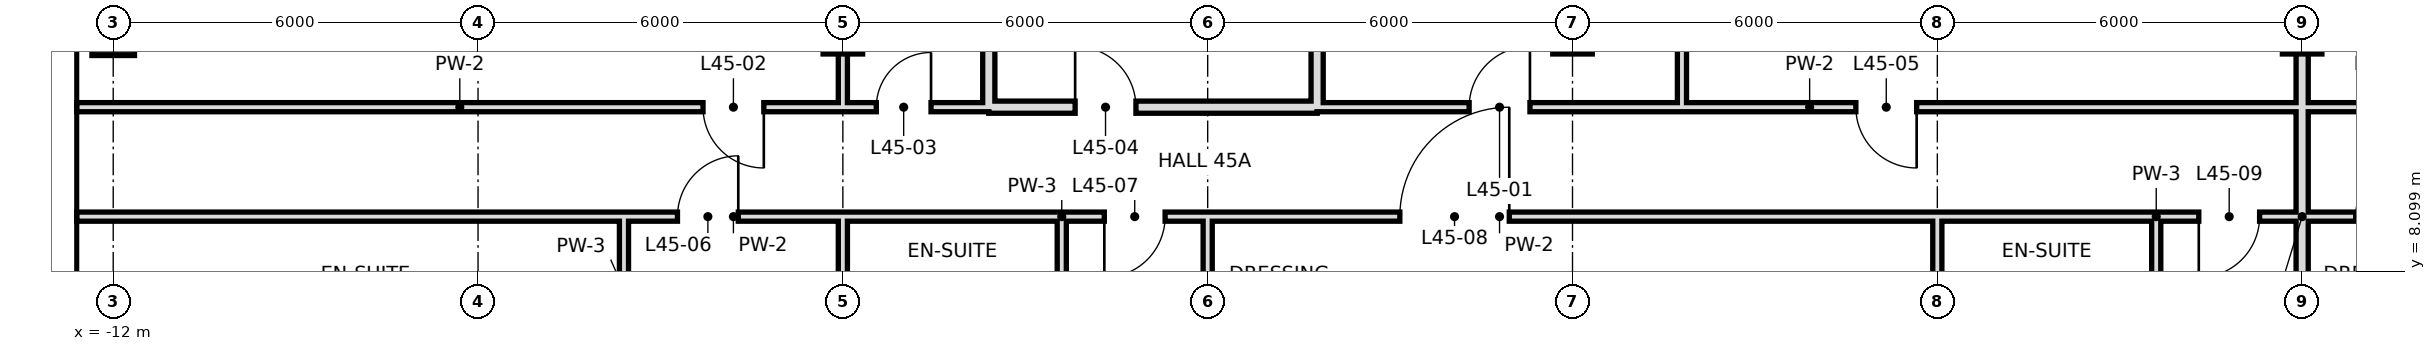
"""IFC4 building model, lengths in metres.
Left out: names, types, materials, properties, quantities, classifications, styles, units other than length and angle.
Written with IfcOpenShell. Run it as: python <this file> out.ifc"""

import sys

from ifc_helpers import new_model, si_unit, direction, frame, frame_2d, origin, origin_2d, place, context, subcontext, project, spatial, rectangle, hollow_rectangle, extrude, element, fill, save


model = new_model("IFC4")
c1 = context("Model", 3, precision=1e-05, world=origin(), true_north=direction((0.0, 1.0)))
c2 = subcontext(c1, "Body", "Model", "MODEL_VIEW")
j1 = project(units=[si_unit("LENGTHUNIT", "METRE"), si_unit("PLANEANGLEUNIT", "RADIAN")], contexts=[c1])
p1 = place(None, origin())
s1 = spatial("IfcSite", under=j1, at=p1, CompositionType="ELEMENT")
p2 = place(p1, origin())
s2 = spatial("IfcBuilding", under=s1, at=p2, CompositionType="ELEMENT")
p3 = place(p2, frame((0.0, 0.0, 195.6)))
s3 = spatial("IfcBuildingStorey", under=s2, at=p3, CompositionType="ELEMENT", Elevation=195.6)
p4 = place(p3, frame((-12.0, 12.0, 0.0), z_axis=(0.0, 0.0, 1.0), x_axis=(1.0, 0.0, 0.0)))
e1 = element("IfcColumn", 1, at=p4, inside=s3, PredefinedType="COLUMN", context=c2, shape_type="SweptSolid", body=[
    extrude(hollow_rectangle(XDim=0.7, YDim=0.7, WallThickness=0.036, at=origin_2d()), origin(), (0.0, 0.0, 1.0), 3.6),
])
for number, where, z_axis, x_axis in (
    (2, (0.0, 12.0, 0.0), (0.0, 0.0, 1.0), (1.0, 0.0, 0.0)),
    (3, (12.0, 12.0, 0.0), (0.0, 0.0, 1.0), (1.0, 0.0, 0.0)),
    (4, (24.0, 12.0, 0.0), (0.0, 0.0, 1.0), (1.0, 0.0, 0.0)),
):
    element("IfcColumn", number, at=place(p3, frame(where, z_axis=z_axis, x_axis=x_axis)), inside=s3, PredefinedType="COLUMN", context=c2, shape_type="SweptSolid", body=[
        extrude(hollow_rectangle(XDim=0.65, YDim=0.65, WallThickness=0.032, at=origin_2d()), origin(), (0.0, 0.0, 1.0), 3.6),
    ])
p5 = place(p3, frame((-3.6, 6.0, 0.0), z_axis=(0.0, 0.0, 1.0), x_axis=(0.0, 1.0, 0.0)))
e5 = element("IfcWall", 5, at=p5, inside=s3, PredefinedType="PARTITIONING", context=c2, shape_type="SweptSolid", body=[
    extrude(rectangle(XDim=3.0, YDim=0.15, at=frame_2d((1.5, 0.0))), origin(), (0.0, 0.0, 1.0), 3.42),
])
p6 = place(p3, frame((0.0, 6.0, 0.0), z_axis=(0.0, 0.0, 1.0), x_axis=(0.0, 1.0, 0.0)))
e6 = element("IfcWall", 6, at=p6, inside=s3, PredefinedType="PARTITIONING", context=c2, shape_type="SweptSolid", body=[
    extrude(rectangle(XDim=3.0, YDim=0.15, at=frame_2d((1.5, 0.0))), origin(), (0.0, 0.0, 1.0), 2.72),
])
p7 = place(p3, frame((0.0, 10.8, 0.0), z_axis=(0.0, 0.0, 1.0), x_axis=(0.0, 1.0, 0.0)))
e7 = element("IfcWall", 7, at=p7, inside=s3, PredefinedType="PARTITIONING", context=c2, shape_type="SweptSolid", body=[
    extrude(rectangle(XDim=7.2, YDim=0.15, at=frame_2d((3.6, 0.0))), origin(), (0.0, 0.0, 1.0), 2.72),
])
p8 = place(p3, frame((13.8, 10.8, 0.0), z_axis=(0.0, 0.0, 1.0), x_axis=(0.0, 1.0, 0.0)))
e8 = element("IfcWall", 8, at=p8, inside=s3, PredefinedType="PARTITIONING", context=c2, shape_type="SweptSolid", body=[
    extrude(rectangle(XDim=4.5, YDim=0.15, at=frame_2d((2.25, 0.0))), origin(), (0.0, 0.0, 1.0), 3.42),
])
p9 = place(p3, frame((18.0, 6.0, 0.0), z_axis=(0.0, 0.0, 1.0), x_axis=(0.0, 1.0, 0.0)))
e9 = element("IfcWall", 9, at=p9, inside=s3, PredefinedType="PARTITIONING", context=c2, shape_type="SweptSolid", body=[
    extrude(rectangle(XDim=3.0, YDim=0.15, at=frame_2d((1.5, 0.0))), origin(), (0.0, 0.0, 1.0), 2.72),
])
p10 = place(p3, frame((2.4, 10.8, 0.0), z_axis=(0.0, 0.0, 1.0), x_axis=(0.0, 1.0, 0.0)))
e10 = element("IfcWall", 10, at=p10, inside=s3, PredefinedType="SOLIDWALL", context=c2, shape_type="SweptSolid", body=[
    extrude(rectangle(XDim=7.2, YDim=0.2, at=frame_2d((3.6, 0.0))), origin(), (0.0, 0.0, 1.0), 2.72),
])
p11 = place(p3, frame((21.6, 6.0, 0.0), z_axis=(0.0, 0.0, 1.0), x_axis=(0.0, 1.0, 0.0)))
e11 = element("IfcWall", 11, at=p11, inside=s3, PredefinedType="PARTITIONING", context=c2, shape_type="SweptSolid", body=[
    extrude(rectangle(XDim=3.0, YDim=0.15, at=frame_2d((1.5, 0.0))), origin(), (0.0, 0.0, 1.0), 3.42),
])
p12 = place(p3, frame((24.0, 0.0, 0.0), z_axis=(0.0, 0.0, 1.0), x_axis=(0.0, 1.0, 0.0)))
e12 = element("IfcWall", 12, at=p12, inside=s3, PredefinedType="SOLIDWALL", context=c2, shape_type="SweptSolid", body=[
    extrude(rectangle(XDim=15.3, YDim=0.2, at=frame_2d((7.65, 0.0))), origin(), (0.0, 0.0, 1.0), 2.72),
])
p13 = place(p3, frame((3.6, 6.0, 0.0), z_axis=(0.0, 0.0, 1.0), x_axis=(0.0, 1.0, 0.0)))
e13 = element("IfcWall", 13, at=p13, inside=s3, PredefinedType="PARTITIONING", context=c2, shape_type="SweptSolid", body=[
    extrude(rectangle(XDim=3.0, YDim=0.15, at=frame_2d((1.5, 0.0))), origin(), (0.0, 0.0, 1.0), 3.42),
])
p14 = place(p3, frame((6.0, -0.6, 0.0), z_axis=(0.0, 0.0, 1.0), x_axis=(0.0, 1.0, 0.0)))
e14 = element("IfcWall", 14, at=p14, inside=s3, PredefinedType="PARTITIONING", context=c2, shape_type="SweptSolid", body=[
    extrude(rectangle(XDim=9.6, YDim=0.15, at=frame_2d((4.8, 0.0))), origin(), (0.0, 0.0, 1.0), 2.72),
])
p15 = place(p3, frame((7.8, 10.8, 0.0), z_axis=(0.0, 0.0, 1.0), x_axis=(0.0, 1.0, 0.0)))
e15 = element("IfcWall", 15, at=p15, inside=s3, PredefinedType="SOLIDWALL", context=c2, shape_type="SweptSolid", body=[
    extrude(rectangle(XDim=4.5, YDim=0.2, at=frame_2d((2.25, 0.0))), origin(), (0.0, 0.0, 1.0), 2.72),
])
p16 = place(p3, frame((2.4, 10.8, 0.0), z_axis=(0.0, 0.0, 1.0), x_axis=(1.0, 0.0, 0.0)))
e16 = element("IfcWall", 16, at=p16, inside=s3, PredefinedType="SOLIDWALL", context=c2, shape_type="SweptSolid", body=[
    extrude(rectangle(XDim=5.4, YDim=0.2, at=frame_2d((2.7, 0.0))), origin(), (0.0, 0.0, 1.0), 2.72),
])
p17 = place(p16, frame((1.42, 0.0, 0.0)))
e17 = element("IfcOpeningElement", 17, at=p17, cuts=e16, PredefinedType="OPENING", context=c2, shape_type="SweptSolid", body=[
    extrude(rectangle(XDim=1.0, YDim=2.4, at=frame_2d((0.5, 1.2))), frame((0.0, 0.11, 0.0), z_axis=(0.0, -1.0, 0.0), x_axis=(1.0, 0.0, 0.0)), (0.0, 0.0, 1.0), 0.22),
])
p18 = place(p3, frame((-12.6, 10.8, 0.0), z_axis=(0.0, 0.0, 1.0), x_axis=(1.0, 0.0, 0.0)))
e18 = element("IfcWall", 18, at=p18, inside=s3, PredefinedType="PARTITIONING", context=c2, shape_type="SweptSolid", body=[
    extrude(rectangle(XDim=12.6, YDim=0.15, at=frame_2d((6.3, 0.0))), origin(), (0.0, 0.0, 1.0), 3.42),
])
p19 = place(p18, frame((10.3, 0.0, 0.0)))
e19 = element("IfcOpeningElement", 19, at=p19, cuts=e18, PredefinedType="OPENING", context=c2, shape_type="SweptSolid", body=[
    extrude(rectangle(XDim=1.0, YDim=2.4, at=frame_2d((0.5, 1.2))), frame((0.0, 0.085, 0.0), z_axis=(0.0, -1.0, 0.0), x_axis=(1.0, 0.0, 0.0)), (0.0, 0.0, 1.0), 0.17),
])
p20 = place(p3, frame((7.8, 10.8, 0.0), z_axis=(0.0, 0.0, 1.0), x_axis=(1.0, 0.0, 0.0)))
e20 = element("IfcWall", 20, at=p20, inside=s3, PredefinedType="PARTITIONING", context=c2, shape_type="SweptSolid", body=[
    extrude(rectangle(XDim=16.2, YDim=0.15, at=frame_2d((8.1, 0.0))), origin(), (0.0, 0.0, 1.0), 3.42),
])
p21 = place(p20, frame((2.5, 0.0, 0.0)))
e21 = element("IfcOpeningElement", 21, at=p21, cuts=e20, PredefinedType="OPENING", context=c2, shape_type="SweptSolid", body=[
    extrude(rectangle(XDim=1.0, YDim=2.4, at=frame_2d((0.5, 1.2))), frame((0.0, 0.085, 0.0), z_axis=(0.0, -1.0, 0.0), x_axis=(1.0, 0.0, 0.0)), (0.0, 0.0, 1.0), 0.17),
])
p22 = place(p20, frame((8.86, 0.0, 0.0)))
e22 = element("IfcOpeningElement", 22, at=p22, cuts=e20, PredefinedType="OPENING", context=c2, shape_type="SweptSolid", body=[
    extrude(rectangle(XDim=1.0, YDim=2.4, at=frame_2d((0.5, 1.2))), frame((0.0, 0.085, 0.0), z_axis=(0.0, -1.0, 0.0), x_axis=(1.0, 0.0, 0.0)), (0.0, 0.0, 1.0), 0.17),
])
p23 = place(p3, frame((0.0, 10.8, 0.0), z_axis=(0.0, 0.0, 1.0), x_axis=(1.0, 0.0, 0.0)))
e23 = element("IfcWall", 23, at=p23, inside=s3, PredefinedType="PARTITIONING", context=c2, shape_type="SweptSolid", body=[
    extrude(rectangle(XDim=2.4, YDim=0.15, at=frame_2d((1.2, 0.0))), origin(), (0.0, 0.0, 1.0), 3.42),
])
p24 = place(p23, frame((0.55, 0.0, 0.0)))
e24 = element("IfcOpeningElement", 24, at=p24, cuts=e23, PredefinedType="OPENING", context=c2, shape_type="SweptSolid", body=[
    extrude(rectangle(XDim=0.9, YDim=2.4, at=frame_2d((0.45, 1.2))), frame((0.0, 0.085, 0.0), z_axis=(0.0, -1.0, 0.0), x_axis=(1.0, 0.0, 0.0)), (0.0, 0.0, 1.0), 0.17),
])
p25 = place(p3, frame((24.0, 10.8, 0.0), z_axis=(0.0, 0.0, 1.0), x_axis=(1.0, 0.0, 0.0)))
e25 = element("IfcWall", 25, at=p25, inside=s3, PredefinedType="PARTITIONING", context=c2, shape_type="SweptSolid", body=[
    extrude(rectangle(XDim=2.4, YDim=0.15, at=frame_2d((1.2, 0.0))), origin(), (0.0, 0.0, 1.0), 3.42),
])
p26 = place(p25, frame((0.95, 0.0, 0.0)))
e26 = element("IfcOpeningElement", 26, at=p26, cuts=e25, PredefinedType="OPENING", context=c2, shape_type="SweptSolid", body=[
    extrude(rectangle(XDim=0.9, YDim=2.4, at=frame_2d((0.45, 1.2))), frame((0.0, 0.085, 0.0), z_axis=(0.0, -1.0, 0.0), x_axis=(1.0, 0.0, 0.0)), (0.0, 0.0, 1.0), 0.17),
])
p27 = place(p3, frame((-3.6, 9.0, 0.0), z_axis=(0.0, 0.0, 1.0), x_axis=(1.0, 0.0, 0.0)))
e27 = element("IfcWall", 27, at=p27, inside=s3, PredefinedType="PARTITIONING", context=c2, shape_type="SweptSolid", body=[
    extrude(rectangle(XDim=3.6, YDim=0.15, at=frame_2d((1.8, 0.0))), origin(), (0.0, 0.0, 1.0), 3.42),
])
p28 = place(p27, frame((0.88, 0.0, 0.0)))
e28 = element("IfcOpeningElement", 28, at=p28, cuts=e27, PredefinedType="OPENING", context=c2, shape_type="SweptSolid", body=[
    extrude(rectangle(XDim=1.0, YDim=2.4, at=frame_2d((0.5, 1.2))), frame((0.0, 0.085, 0.0), z_axis=(0.0, -1.0, 0.0), x_axis=(1.0, 0.0, 0.0)), (0.0, 0.0, 1.0), 0.17),
])
p29 = place(p3, frame((3.6, 9.0, 0.0), z_axis=(0.0, 0.0, 1.0), x_axis=(1.0, 0.0, 0.0)))
e29 = element("IfcWall", 29, at=p29, inside=s3, PredefinedType="PARTITIONING", context=c2, shape_type="SweptSolid", body=[
    extrude(rectangle(XDim=14.4, YDim=0.15, at=frame_2d((7.2, 0.0))), origin(), (0.0, 0.0, 1.0), 3.42),
])
p30 = place(p29, frame((0.7, 0.0, 0.0)))
e30 = element("IfcOpeningElement", 30, at=p30, cuts=e29, PredefinedType="OPENING", context=c2, shape_type="SweptSolid", body=[
    extrude(rectangle(XDim=1.0, YDim=2.4, at=frame_2d((0.5, 1.2))), frame((0.0, 0.085, 0.0), z_axis=(0.0, -1.0, 0.0), x_axis=(1.0, 0.0, 0.0)), (0.0, 0.0, 1.0), 0.17),
])
p31 = place(p29, frame((5.56, 0.0, 0.0)))
e31 = element("IfcOpeningElement", 31, at=p31, cuts=e29, PredefinedType="OPENING", context=c2, shape_type="SweptSolid", body=[
    extrude(rectangle(XDim=1.8, YDim=2.4, at=frame_2d((0.9, 1.2))), frame((0.0, 0.085, 0.0), z_axis=(0.0, -1.0, 0.0), x_axis=(1.0, 0.0, 0.0)), (0.0, 0.0, 1.0), 0.17),
])
p32 = place(p3, frame((21.6, 9.0, 0.0), z_axis=(0.0, 0.0, 1.0), x_axis=(1.0, 0.0, 0.0)))
e32 = element("IfcWall", 32, at=p32, inside=s3, PredefinedType="PARTITIONING", context=c2, shape_type="SweptSolid", body=[
    extrude(rectangle(XDim=4.8, YDim=0.15, at=frame_2d((2.4, 0.0))), origin(), (0.0, 0.0, 1.0), 3.42),
])
p33 = place(p32, frame((0.7, 0.0, 0.0)))
e33 = element("IfcOpeningElement", 33, at=p33, cuts=e32, PredefinedType="OPENING", context=c2, shape_type="SweptSolid", body=[
    extrude(rectangle(XDim=1.0, YDim=2.4, at=frame_2d((0.5, 1.2))), frame((0.0, 0.085, 0.0), z_axis=(0.0, -1.0, 0.0), x_axis=(1.0, 0.0, 0.0)), (0.0, 0.0, 1.0), 0.17),
])
p34 = place(p32, frame((3.28, 0.0, 0.0)))
e34 = element("IfcOpeningElement", 34, at=p34, cuts=e32, PredefinedType="OPENING", context=c2, shape_type="SweptSolid", body=[
    extrude(rectangle(XDim=1.0, YDim=2.4, at=frame_2d((0.5, 1.2))), frame((0.0, 0.085, 0.0), z_axis=(0.0, -1.0, 0.0), x_axis=(1.0, 0.0, 0.0)), (0.0, 0.0, 1.0), 0.17),
])
p35 = place(p3, frame((-12.6, 9.0, 0.0), z_axis=(0.0, 0.0, 1.0), x_axis=(1.0, 0.0, 0.0)))
e35 = element("IfcWall", 35, at=p35, inside=s3, PredefinedType="PARTITIONING", context=c2, shape_type="SweptSolid", body=[
    extrude(rectangle(XDim=9.0, YDim=0.15, at=frame_2d((4.5, 0.0))), origin(), (0.0, 0.0, 1.0), 3.42),
])
for number, where, z_axis, x_axis in (
    (36, (0.0, 9.0, 0.0), (0.0, 0.0, 1.0), (1.0, 0.0, 0.0)),
    (37, (18.0, 9.0, 0.0), (0.0, 0.0, 1.0), (1.0, 0.0, 0.0)),
):
    element("IfcWall", number, at=place(p3, frame(where, z_axis=z_axis, x_axis=x_axis)), inside=s3, PredefinedType="PARTITIONING", context=c2, shape_type="SweptSolid", body=[
        extrude(rectangle(XDim=3.6, YDim=0.15, at=frame_2d((1.8, 0.0))), origin(), (0.0, 0.0, 1.0), 3.42),
    ])
p36 = place(p21, frame((1.0, 0.0, 0.0), z_axis=(0.0, 0.0, 1.0), x_axis=(-1.0, 0.0, 0.0)))
e38 = element("IfcDoor", 38, at=p36, inside=s3, OperationType="SINGLE_SWING_LEFT", PredefinedType="DOOR", context=c2, shape_type="SweptSolid", body=[
    extrude(rectangle(XDim=1.0, YDim=2.4, at=frame_2d((0.5, 1.2))), frame((0.0, 0.025, 0.0), z_axis=(0.0, -1.0, 0.0), x_axis=(1.0, 0.0, 0.0)), (0.0, 0.0, 1.0), 0.05),
])
fill(e21, e38)
p37 = place(p19, origin())
e39 = element("IfcDoor", 39, at=p37, inside=s3, OperationType="SINGLE_SWING_RIGHT", PredefinedType="DOOR", context=c2, shape_type="SweptSolid", body=[
    extrude(rectangle(XDim=1.0, YDim=2.4, at=frame_2d((0.5, 1.2))), frame((0.0, 0.025, 0.0), z_axis=(0.0, -1.0, 0.0), x_axis=(1.0, 0.0, 0.0)), (0.0, 0.0, 1.0), 0.05),
])
fill(e19, e39)
p38 = place(p24, frame((0.9, 0.0, 0.0), z_axis=(0.0, 0.0, 1.0), x_axis=(-1.0, 0.0, 0.0)))
e40 = element("IfcDoor", 40, at=p38, inside=s3, OperationType="SINGLE_SWING_LEFT", PredefinedType="DOOR", context=c2, shape_type="SweptSolid", body=[
    extrude(rectangle(XDim=0.9, YDim=2.4, at=frame_2d((0.45, 1.2))), frame((0.0, 0.025, 0.0), z_axis=(0.0, -1.0, 0.0), x_axis=(1.0, 0.0, 0.0)), (0.0, 0.0, 1.0), 0.05),
])
fill(e24, e40)
p39 = place(p17, origin())
e41 = element("IfcDoor", 41, at=p39, inside=s3, OperationType="SINGLE_SWING_LEFT", PredefinedType="DOOR", context=c2, shape_type="SweptSolid", body=[
    extrude(rectangle(XDim=1.0, YDim=2.4, at=frame_2d((0.5, 1.2))), frame((0.0, 0.025, 0.0), z_axis=(0.0, -1.0, 0.0), x_axis=(1.0, 0.0, 0.0)), (0.0, 0.0, 1.0), 0.05),
])
fill(e17, e41)
p40 = place(p22, origin())
e42 = element("IfcDoor", 42, at=p40, inside=s3, OperationType="SINGLE_SWING_RIGHT", PredefinedType="DOOR", context=c2, shape_type="SweptSolid", body=[
    extrude(rectangle(XDim=1.0, YDim=2.4, at=frame_2d((0.5, 1.2))), frame((0.0, 0.025, 0.0), z_axis=(0.0, -1.0, 0.0), x_axis=(1.0, 0.0, 0.0)), (0.0, 0.0, 1.0), 0.05),
])
fill(e22, e42)
p41 = place(p28, frame((1.0, 0.0, 0.0), z_axis=(0.0, 0.0, 1.0), x_axis=(-1.0, 0.0, 0.0)))
e43 = element("IfcDoor", 43, at=p41, inside=s3, OperationType="SINGLE_SWING_LEFT", PredefinedType="DOOR", context=c2, shape_type="SweptSolid", body=[
    extrude(rectangle(XDim=1.0, YDim=2.4, at=frame_2d((0.5, 1.2))), frame((0.0, 0.025, 0.0), z_axis=(0.0, -1.0, 0.0), x_axis=(1.0, 0.0, 0.0)), (0.0, 0.0, 1.0), 0.05),
])
fill(e28, e43)
p42 = place(p30, frame((1.0, 0.0, 0.0), z_axis=(0.0, 0.0, 1.0), x_axis=(-1.0, 0.0, 0.0)))
e44 = element("IfcDoor", 44, at=p42, inside=s3, OperationType="SINGLE_SWING_RIGHT", PredefinedType="DOOR", context=c2, shape_type="SweptSolid", body=[
    extrude(rectangle(XDim=1.0, YDim=2.4, at=frame_2d((0.5, 1.2))), frame((0.0, 0.025, 0.0), z_axis=(0.0, -1.0, 0.0), x_axis=(1.0, 0.0, 0.0)), (0.0, 0.0, 1.0), 0.05),
])
fill(e30, e44)
p43 = place(p31, frame((1.8, 0.0, 0.0), z_axis=(0.0, 0.0, 1.0), x_axis=(-1.0, 0.0, 0.0)))
e45 = element("IfcDoor", 45, at=p43, inside=s3, OperationType="SINGLE_SWING_LEFT", PredefinedType="DOOR", context=c2, shape_type="SweptSolid", body=[
    extrude(rectangle(XDim=1.8, YDim=2.4, at=frame_2d((0.9, 1.2))), frame((0.0, 0.025, 0.0), z_axis=(0.0, -1.0, 0.0), x_axis=(1.0, 0.0, 0.0)), (0.0, 0.0, 1.0), 0.05),
])
fill(e31, e45)
p44 = place(p33, frame((1.0, 0.0, 0.0), z_axis=(0.0, 0.0, 1.0), x_axis=(-1.0, 0.0, 0.0)))
e46 = element("IfcDoor", 46, at=p44, inside=s3, OperationType="SINGLE_SWING_RIGHT", PredefinedType="DOOR", context=c2, shape_type="SweptSolid", body=[
    extrude(rectangle(XDim=1.0, YDim=2.4, at=frame_2d((0.5, 1.2))), frame((0.0, 0.025, 0.0), z_axis=(0.0, -1.0, 0.0), x_axis=(1.0, 0.0, 0.0)), (0.0, 0.0, 1.0), 0.05),
])
fill(e33, e46)
p45 = place(p34, frame((1.0, 0.0, 0.0), z_axis=(0.0, 0.0, 1.0), x_axis=(-1.0, 0.0, 0.0)))
e47 = element("IfcDoor", 47, at=p45, inside=s3, OperationType="SINGLE_SWING_LEFT", PredefinedType="DOOR", context=c2, shape_type="SweptSolid", body=[
    extrude(rectangle(XDim=1.0, YDim=2.4, at=frame_2d((0.5, 1.2))), frame((0.0, 0.025, 0.0), z_axis=(0.0, -1.0, 0.0), x_axis=(1.0, 0.0, 0.0)), (0.0, 0.0, 1.0), 0.05),
])
fill(e34, e47)
save(model, sys.argv[1])
